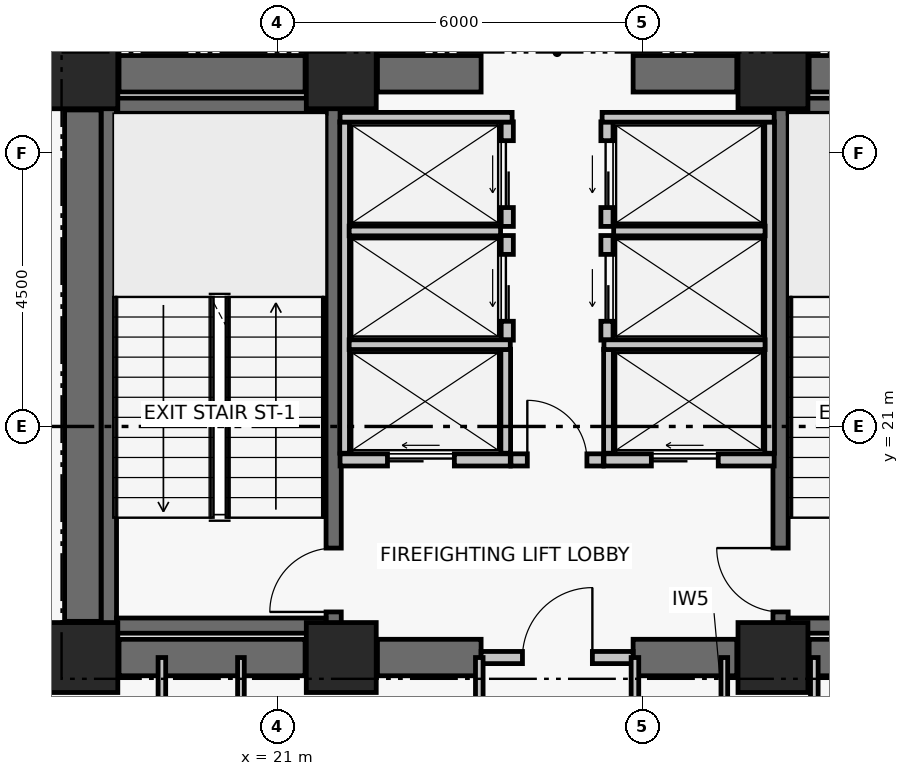
"""IFC4 building model, lengths in metres.
Left out: names, types, materials, properties, quantities, classifications, styles, units other than length and angle.
Written with IfcOpenShell. Run it as: python <this file> out.ifc"""

import sys

from ifc_helpers import new_model, si_unit, direction, frame, frame_2d, origin, origin_2d, place, context, subcontext, project, spatial, rectangle, extrude, element, fill, save


model = new_model("IFC4")
c1 = context("Model", 3, precision=1e-05, world=origin(), true_north=direction((0.0, 1.0)))
c2 = subcontext(c1, "Body", "Model", "MODEL_VIEW")
j1 = project(units=[si_unit("LENGTHUNIT", "METRE"), si_unit("PLANEANGLEUNIT", "RADIAN")], contexts=[c1])
p1 = place(None, origin())
s1 = spatial("IfcSite", under=j1, at=p1, CompositionType="ELEMENT")
p2 = place(p1, origin())
s2 = spatial("IfcBuilding", under=s1, at=p2, CompositionType="ELEMENT")
p3 = place(p2, frame((0.0, 0.0, 64.8)))
s3 = spatial("IfcBuildingStorey", under=s2, at=p3, CompositionType="ELEMENT", Elevation=64.8)
for number, where, z_axis, x_axis in (
    (1, (17.8, 17.2, 0.0), (0.0, 0.0, 1.0), (1.0, 0.0, 0.0)),
    (2, (22.05, 17.2, 0.0), (0.0, 0.0, 1.0), (1.0, 0.0, 0.0)),
    (3, (29.15, 17.2, 0.0), (0.0, 0.0, 1.0), (1.0, 0.0, 0.0)),
    (4, (17.8, 26.8, 0.0), (0.0, 0.0, 1.0), (1.0, 0.0, 0.0)),
    (5, (22.05, 26.8, 0.0), (0.0, 0.0, 1.0), (1.0, 0.0, 0.0)),
    (6, (29.15, 26.8, 0.0), (0.0, 0.0, 1.0), (1.0, 0.0, 0.0)),
):
    element("IfcColumn", number, at=place(p3, frame(where, z_axis=z_axis, x_axis=x_axis)), inside=s3, PredefinedType="COLUMN", context=c2, shape_type="SweptSolid", body=[
        extrude(rectangle(XDim=1.15, YDim=1.15, at=origin_2d()), origin(), (0.0, 0.0, 1.0), 3.72),
    ])
p4 = place(p3, frame((18.395, 17.2, 0.0), z_axis=(0.0, 0.0, 1.0), x_axis=(1.0, 0.0, 0.0)))
e7 = element("IfcWall", 7, at=p4, inside=s3, PredefinedType="SHEAR", context=c2, shape_type="SweptSolid", body=[
    extrude(rectangle(XDim=3.06, YDim=0.6, at=frame_2d((1.53, 0.0))), origin(), (0.0, 0.0, 1.0), 3.44),
])
p5 = place(p3, frame((22.645, 17.2, 0.0), z_axis=(0.0, 0.0, 1.0), x_axis=(1.0, 0.0, 0.0)))
e8 = element("IfcWall", 8, at=p5, inside=s3, PredefinedType="SHEAR", context=c2, shape_type="SweptSolid", body=[
    extrude(rectangle(XDim=1.705, YDim=0.6, at=frame_2d((0.853, 0.0))), origin(), (0.0, 0.0, 1.0), 3.44),
])
p6 = place(p3, frame((26.85, 17.2, 0.0), z_axis=(0.0, 0.0, 1.0), x_axis=(1.0, 0.0, 0.0)))
e9 = element("IfcWall", 9, at=p6, inside=s3, PredefinedType="SHEAR", context=c2, shape_type="SweptSolid", body=[
    extrude(rectangle(XDim=1.705, YDim=0.6, at=frame_2d((0.853, 0.0))), origin(), (0.0, 0.0, 1.0), 3.44),
])
p7 = place(p3, frame((29.745, 17.2, 0.0), z_axis=(0.0, 0.0, 1.0), x_axis=(1.0, 0.0, 0.0)))
e10 = element("IfcWall", 10, at=p7, inside=s3, PredefinedType="SHEAR", context=c2, shape_type="SweptSolid", body=[
    extrude(rectangle(XDim=3.06, YDim=0.6, at=frame_2d((1.53, 0.0))), origin(), (0.0, 0.0, 1.0), 3.44),
])
p8 = place(p3, frame((18.395, 26.8, 0.0), z_axis=(0.0, 0.0, 1.0), x_axis=(1.0, 0.0, 0.0)))
e11 = element("IfcWall", 11, at=p8, inside=s3, PredefinedType="SHEAR", context=c2, shape_type="SweptSolid", body=[
    extrude(rectangle(XDim=3.06, YDim=0.6, at=frame_2d((1.53, 0.0))), origin(), (0.0, 0.0, 1.0), 3.44),
])
p9 = place(p3, frame((22.645, 26.8, 0.0), z_axis=(0.0, 0.0, 1.0), x_axis=(1.0, 0.0, 0.0)))
e12 = element("IfcWall", 12, at=p9, inside=s3, PredefinedType="SHEAR", context=c2, shape_type="SweptSolid", body=[
    extrude(rectangle(XDim=1.705, YDim=0.6, at=frame_2d((0.853, 0.0))), origin(), (0.0, 0.0, 1.0), 3.44),
])
p10 = place(p3, frame((26.85, 26.8, 0.0), z_axis=(0.0, 0.0, 1.0), x_axis=(1.0, 0.0, 0.0)))
e13 = element("IfcWall", 13, at=p10, inside=s3, PredefinedType="SHEAR", context=c2, shape_type="SweptSolid", body=[
    extrude(rectangle(XDim=1.705, YDim=0.6, at=frame_2d((0.853, 0.0))), origin(), (0.0, 0.0, 1.0), 3.44),
])
p11 = place(p3, frame((29.745, 26.8, 0.0), z_axis=(0.0, 0.0, 1.0), x_axis=(1.0, 0.0, 0.0)))
e14 = element("IfcWall", 14, at=p11, inside=s3, PredefinedType="SHEAR", context=c2, shape_type="SweptSolid", body=[
    extrude(rectangle(XDim=3.06, YDim=0.6, at=frame_2d((1.53, 0.0))), origin(), (0.0, 0.0, 1.0), 3.44),
])
p12 = place(p3, frame((17.8, 17.795, 0.0), z_axis=(0.0, 0.0, 1.0), x_axis=(0.0, 1.0, 0.0)))
e15 = element("IfcWall", 15, at=p12, inside=s3, PredefinedType="SHEAR", context=c2, shape_type="SweptSolid", body=[
    extrude(rectangle(XDim=8.41, YDim=0.6, at=frame_2d((4.205, 0.0))), origin(), (0.0, 0.0, 1.0), 3.44),
])
p13 = place(p3, frame((18.229, 17.6, 0.0), z_axis=(0.0, 0.0, 1.0), x_axis=(0.0, 1.0, 0.0)))
e16 = element("IfcWall", 16, at=p13, inside=s3, PredefinedType="SHEAR", context=c2, shape_type="SweptSolid", body=[
    extrude(rectangle(XDim=8.8, YDim=0.25, at=frame_2d((4.4, 0.0))), origin(), (0.0, 0.0, 1.0), 3.44),
])
p14 = place(p3, frame((21.925, 17.6, 0.0), z_axis=(0.0, 0.0, 1.0), x_axis=(0.0, 1.0, 0.0)))
e17 = element("IfcWall", 17, at=p14, inside=s3, PredefinedType="SHEAR", context=c2, shape_type="SweptSolid", body=[
    extrude(rectangle(XDim=8.8, YDim=0.25, at=frame_2d((4.4, 0.0))), origin(), (0.0, 0.0, 1.0), 3.44),
])
p15 = place(p14, frame((0.35, 0.0, 0.0)))
e18 = element("IfcOpeningElement", 18, at=p15, cuts=e17, PredefinedType="OPENING", context=c2, shape_type="SweptSolid", body=[
    extrude(rectangle(XDim=1.05, YDim=2.08, at=frame_2d((0.525, 1.04))), frame((0.0, 0.135, 0.0), z_axis=(0.0, -1.0, 0.0), x_axis=(1.0, 0.0, 0.0)), (0.0, 0.0, 1.0), 0.27),
])
for number, where, z_axis, x_axis in (
    (19, (18.354, 17.725, 0.0), (0.0, 0.0, 1.0), (1.0, 0.0, 0.0)),
    (20, (18.354, 26.275, 0.0), (0.0, 0.0, 1.0), (1.0, 0.0, 0.0)),
):
    element("IfcWall", number, at=place(p3, frame(where, z_axis=z_axis, x_axis=x_axis)), inside=s3, PredefinedType="SHEAR", context=c2, shape_type="SweptSolid", body=[
        extrude(rectangle(XDim=3.446, YDim=0.25, at=frame_2d((1.723, 0.0))), origin(), (0.0, 0.0, 1.0), 3.44),
    ])
p16 = place(p3, frame((29.275, 17.6, 0.0), z_axis=(0.0, 0.0, 1.0), x_axis=(0.0, 1.0, 0.0)))
e21 = element("IfcWall", 21, at=p16, inside=s3, PredefinedType="SHEAR", context=c2, shape_type="SweptSolid", body=[
    extrude(rectangle(XDim=8.8, YDim=0.25, at=frame_2d((4.4, 0.0))), origin(), (0.0, 0.0, 1.0), 3.44),
])
p17 = place(p16, frame((0.35, 0.0, 0.0)))
e22 = element("IfcOpeningElement", 22, at=p17, cuts=e21, PredefinedType="OPENING", context=c2, shape_type="SweptSolid", body=[
    extrude(rectangle(XDim=1.05, YDim=2.08, at=frame_2d((0.525, 1.04))), frame((0.0, 0.135, 0.0), z_axis=(0.0, -1.0, 0.0), x_axis=(1.0, 0.0, 0.0)), (0.0, 0.0, 1.0), 0.27),
])
for number, where, z_axis, x_axis in (
    (23, (29.4, 17.725, 0.0), (0.0, 0.0, 1.0), (1.0, 0.0, 0.0)),
    (24, (29.4, 26.275, 0.0), (0.0, 0.0, 1.0), (1.0, 0.0, 0.0)),
):
    element("IfcWall", number, at=place(p3, frame(where, z_axis=z_axis, x_axis=x_axis)), inside=s3, PredefinedType="SHEAR", context=c2, shape_type="SweptSolid", body=[
        extrude(rectangle(XDim=3.446, YDim=0.25, at=frame_2d((1.723, 0.0))), origin(), (0.0, 0.0, 1.0), 3.44),
    ])
p18 = place(p3, frame((24.35, 17.2, 0.0), z_axis=(0.0, 0.0, 1.0), x_axis=(1.0, 0.0, 0.0)))
e25 = element("IfcWall", 25, at=p18, inside=s3, PredefinedType="PARTITIONING", context=c2, shape_type="SweptSolid", body=[
    extrude(rectangle(XDim=2.5, YDim=0.2, at=frame_2d((1.25, 0.0))), origin(), (0.0, 0.0, 1.0), 2.57),
])
p19 = place(p18, frame((0.68, 0.0, 0.0)))
e26 = element("IfcOpeningElement", 26, at=p19, cuts=e25, PredefinedType="OPENING", context=c2, shape_type="SweptSolid", body=[
    extrude(rectangle(XDim=1.15, YDim=2.08, at=frame_2d((0.575, 1.04))), frame((0.0, 0.11, 0.0), z_axis=(0.0, -1.0, 0.0), x_axis=(1.0, 0.0, 0.0)), (0.0, 0.0, 1.0), 0.22),
])
p20 = place(p3, frame((24.84, 20.45, 0.0), z_axis=(0.0, 0.0, 1.0), x_axis=(1.0, 0.0, 0.0)))
e27 = element("IfcWall", 27, at=p20, inside=s3, PredefinedType="PARTITIONING", context=c2, shape_type="SweptSolid", body=[
    extrude(rectangle(XDim=1.52, YDim=0.2, at=frame_2d((0.76, 0.0))), origin(), (0.0, 0.0, 1.0), 3.44),
])
p21 = place(p20, frame((0.27, 0.0, 0.0)))
e28 = element("IfcOpeningElement", 28, at=p21, cuts=e27, PredefinedType="OPENING", context=c2, shape_type="SweptSolid", body=[
    extrude(rectangle(XDim=0.98, YDim=2.06, at=frame_2d((0.49, 1.03))), frame((0.0, 0.11, 0.0), z_axis=(0.0, -1.0, 0.0), x_axis=(1.0, 0.0, 0.0)), (0.0, 0.0, 1.0), 0.22),
])
p22 = place(p3, frame((22.03, 20.45, 0.0), z_axis=(0.0, 0.0, 1.0), x_axis=(1.0, 0.0, 0.0)))
e29 = element("IfcWall", 29, at=p22, inside=s3, PredefinedType="PARTITIONING", context=c2, shape_type="SweptSolid", body=[
    extrude(rectangle(XDim=2.8, YDim=0.2, at=frame_2d((1.4, 0.0))), origin(), (0.0, 0.0, 1.0), 3.44),
])
p23 = place(p22, frame((0.78, 0.0, 0.0)))
e30 = element("IfcOpeningElement", 30, at=p23, cuts=e29, PredefinedType="OPENING", context=c2, shape_type="SweptSolid", body=[
    extrude(rectangle(XDim=1.1, YDim=2.08, at=frame_2d((0.55, 1.04))), frame((0.0, 0.11, 0.0), z_axis=(0.0, -1.0, 0.0), x_axis=(1.0, 0.0, 0.0)), (0.0, 0.0, 1.0), 0.22),
])
p24 = place(p3, frame((26.37, 20.45, 0.0), z_axis=(0.0, 0.0, 1.0), x_axis=(1.0, 0.0, 0.0)))
e31 = element("IfcWall", 31, at=p24, inside=s3, PredefinedType="PARTITIONING", context=c2, shape_type="SweptSolid", body=[
    extrude(rectangle(XDim=2.8, YDim=0.2, at=frame_2d((1.4, 0.0))), origin(), (0.0, 0.0, 1.0), 3.44),
])
p25 = place(p24, frame((0.78, 0.0, 0.0)))
e32 = element("IfcOpeningElement", 32, at=p25, cuts=e31, PredefinedType="OPENING", context=c2, shape_type="SweptSolid", body=[
    extrude(rectangle(XDim=1.1, YDim=2.08, at=frame_2d((0.55, 1.04))), frame((0.0, 0.11, 0.0), z_axis=(0.0, -1.0, 0.0), x_axis=(1.0, 0.0, 0.0)), (0.0, 0.0, 1.0), 0.22),
])
p26 = place(p3, frame((24.78, 22.42, 0.0), z_axis=(0.0, 0.0, 1.0), x_axis=(0.0, 1.0, 0.0)))
e33 = element("IfcWall", 33, at=p26, inside=s3, PredefinedType="PARTITIONING", context=c2, shape_type="SweptSolid", body=[
    extrude(rectangle(XDim=1.72, YDim=0.2, at=frame_2d((0.86, 0.0))), origin(), (0.0, 0.0, 1.0), 3.44),
])
p27 = place(p26, frame((0.31, 0.0, 0.0)))
e34 = element("IfcOpeningElement", 34, at=p27, cuts=e33, PredefinedType="OPENING", context=c2, shape_type="SweptSolid", body=[
    extrude(rectangle(XDim=1.1, YDim=2.08, at=frame_2d((0.55, 1.04))), frame((0.0, 0.11, 0.0), z_axis=(0.0, -1.0, 0.0), x_axis=(1.0, 0.0, 0.0)), (0.0, 0.0, 1.0), 0.22),
])
p28 = place(p3, frame((24.78, 24.29, 0.0), z_axis=(0.0, 0.0, 1.0), x_axis=(0.0, 1.0, 0.0)))
e35 = element("IfcWall", 35, at=p28, inside=s3, PredefinedType="PARTITIONING", context=c2, shape_type="SweptSolid", body=[
    extrude(rectangle(XDim=1.72, YDim=0.2, at=frame_2d((0.86, 0.0))), origin(), (0.0, 0.0, 1.0), 3.44),
])
p29 = place(p28, frame((0.31, 0.0, 0.0)))
e36 = element("IfcOpeningElement", 36, at=p29, cuts=e35, PredefinedType="OPENING", context=c2, shape_type="SweptSolid", body=[
    extrude(rectangle(XDim=1.1, YDim=2.08, at=frame_2d((0.55, 1.04))), frame((0.0, 0.11, 0.0), z_axis=(0.0, -1.0, 0.0), x_axis=(1.0, 0.0, 0.0)), (0.0, 0.0, 1.0), 0.22),
])
p30 = place(p3, frame((26.42, 22.42, 0.0), z_axis=(0.0, 0.0, 1.0), x_axis=(0.0, 1.0, 0.0)))
e37 = element("IfcWall", 37, at=p30, inside=s3, PredefinedType="PARTITIONING", context=c2, shape_type="SweptSolid", body=[
    extrude(rectangle(XDim=1.72, YDim=0.2, at=frame_2d((0.86, 0.0))), origin(), (0.0, 0.0, 1.0), 3.44),
])
p31 = place(p30, frame((0.31, 0.0, 0.0)))
e38 = element("IfcOpeningElement", 38, at=p31, cuts=e37, PredefinedType="OPENING", context=c2, shape_type="SweptSolid", body=[
    extrude(rectangle(XDim=1.1, YDim=2.08, at=frame_2d((0.55, 1.04))), frame((0.0, 0.11, 0.0), z_axis=(0.0, -1.0, 0.0), x_axis=(1.0, 0.0, 0.0)), (0.0, 0.0, 1.0), 0.22),
])
p32 = place(p3, frame((26.42, 24.29, 0.0), z_axis=(0.0, 0.0, 1.0), x_axis=(0.0, 1.0, 0.0)))
e39 = element("IfcWall", 39, at=p32, inside=s3, PredefinedType="PARTITIONING", context=c2, shape_type="SweptSolid", body=[
    extrude(rectangle(XDim=1.72, YDim=0.2, at=frame_2d((0.86, 0.0))), origin(), (0.0, 0.0, 1.0), 3.44),
])
p33 = place(p32, frame((0.31, 0.0, 0.0)))
e40 = element("IfcOpeningElement", 40, at=p33, cuts=e39, PredefinedType="OPENING", context=c2, shape_type="SweptSolid", body=[
    extrude(rectangle(XDim=1.1, YDim=2.08, at=frame_2d((0.55, 1.04))), frame((0.0, 0.11, 0.0), z_axis=(0.0, -1.0, 0.0), x_axis=(1.0, 0.0, 0.0)), (0.0, 0.0, 1.0), 0.22),
])
p34 = place(p3, frame((22.105, 20.56, 0.0), z_axis=(0.0, 0.0, 1.0), x_axis=(0.0, 1.0, 0.0)))
e41 = element("IfcWall", 41, at=p34, inside=s3, PredefinedType="PARTITIONING", context=c2, shape_type="SweptSolid", body=[
    extrude(rectangle(XDim=5.45, YDim=0.16, at=frame_2d((2.725, 0.0))), origin(), (0.0, 0.0, 1.0), 3.44),
])
p35 = place(p3, frame((24.755, 20.56, 0.0), z_axis=(0.0, 0.0, 1.0), x_axis=(0.0, 1.0, 0.0)))
e42 = element("IfcWall", 42, at=p35, inside=s3, PredefinedType="PARTITIONING", context=c2, shape_type="SweptSolid", body=[
    extrude(rectangle(XDim=1.71, YDim=0.16, at=frame_2d((0.855, 0.0))), origin(), (0.0, 0.0, 1.0), 3.44),
])
p36 = place(p3, frame((22.18, 22.345, 0.0), z_axis=(0.0, 0.0, 1.0), x_axis=(1.0, 0.0, 0.0)))
e43 = element("IfcWall", 43, at=p36, inside=s3, PredefinedType="PARTITIONING", context=c2, shape_type="SweptSolid", body=[
    extrude(rectangle(XDim=2.65, YDim=0.16, at=frame_2d((1.325, 0.0))), origin(), (0.0, 0.0, 1.0), 3.44),
])
p37 = place(p3, frame((22.18, 24.215, 0.0), z_axis=(0.0, 0.0, 1.0), x_axis=(1.0, 0.0, 0.0)))
e44 = element("IfcWall", 44, at=p37, inside=s3, PredefinedType="PARTITIONING", context=c2, shape_type="SweptSolid", body=[
    extrude(rectangle(XDim=2.49, YDim=0.16, at=frame_2d((1.245, 0.0))), origin(), (0.0, 0.0, 1.0), 3.44),
])
p38 = place(p3, frame((22.03, 26.085, 0.0), z_axis=(0.0, 0.0, 1.0), x_axis=(1.0, 0.0, 0.0)))
e45 = element("IfcWall", 45, at=p38, inside=s3, PredefinedType="PARTITIONING", context=c2, shape_type="SweptSolid", body=[
    extrude(rectangle(XDim=2.83, YDim=0.16, at=frame_2d((1.415, 0.0))), origin(), (0.0, 0.0, 1.0), 3.44),
])
p39 = place(p3, frame((29.095, 20.56, 0.0), z_axis=(0.0, 0.0, 1.0), x_axis=(0.0, 1.0, 0.0)))
e46 = element("IfcWall", 46, at=p39, inside=s3, PredefinedType="PARTITIONING", context=c2, shape_type="SweptSolid", body=[
    extrude(rectangle(XDim=5.45, YDim=0.16, at=frame_2d((2.725, 0.0))), origin(), (0.0, 0.0, 1.0), 3.44),
])
p40 = place(p3, frame((26.445, 20.56, 0.0), z_axis=(0.0, 0.0, 1.0), x_axis=(0.0, 1.0, 0.0)))
e47 = element("IfcWall", 47, at=p40, inside=s3, PredefinedType="PARTITIONING", context=c2, shape_type="SweptSolid", body=[
    extrude(rectangle(XDim=1.71, YDim=0.16, at=frame_2d((0.855, 0.0))), origin(), (0.0, 0.0, 1.0), 3.44),
])
p41 = place(p3, frame((26.37, 22.345, 0.0), z_axis=(0.0, 0.0, 1.0), x_axis=(1.0, 0.0, 0.0)))
e48 = element("IfcWall", 48, at=p41, inside=s3, PredefinedType="PARTITIONING", context=c2, shape_type="SweptSolid", body=[
    extrude(rectangle(XDim=2.65, YDim=0.16, at=frame_2d((1.325, 0.0))), origin(), (0.0, 0.0, 1.0), 3.44),
])
p42 = place(p3, frame((26.53, 24.215, 0.0), z_axis=(0.0, 0.0, 1.0), x_axis=(1.0, 0.0, 0.0)))
e49 = element("IfcWall", 49, at=p42, inside=s3, PredefinedType="PARTITIONING", context=c2, shape_type="SweptSolid", body=[
    extrude(rectangle(XDim=2.49, YDim=0.16, at=frame_2d((1.245, 0.0))), origin(), (0.0, 0.0, 1.0), 3.44),
])
p43 = place(p3, frame((26.34, 26.085, 0.0), z_axis=(0.0, 0.0, 1.0), x_axis=(1.0, 0.0, 0.0)))
e50 = element("IfcWall", 50, at=p43, inside=s3, PredefinedType="PARTITIONING", context=c2, shape_type="SweptSolid", body=[
    extrude(rectangle(XDim=2.83, YDim=0.16, at=frame_2d((1.415, 0.0))), origin(), (0.0, 0.0, 1.0), 3.44),
])
p44 = place(p3, frame((19.1, 14.95, 0.0), z_axis=(0.0, 0.0, 1.0), x_axis=(0.0, 1.0, 0.0)))
e51 = element("IfcWall", 51, at=p44, inside=s3, PredefinedType="PARTITIONING", context=c2, shape_type="SweptSolid", body=[
    extrude(rectangle(XDim=2.25, YDim=0.125, at=frame_2d((1.125, 0.0))), origin(), (0.0, 0.0, 1.0), 2.57),
])
p45 = place(p3, frame((20.4, 14.95, 0.0), z_axis=(0.0, 0.0, 1.0), x_axis=(0.0, 1.0, 0.0)))
e52 = element("IfcWall", 52, at=p45, inside=s3, PredefinedType="PARTITIONING", context=c2, shape_type="SweptSolid", body=[
    extrude(rectangle(XDim=2.25, YDim=0.11, at=frame_2d((1.125, 0.0))), origin(), (0.0, 0.0, 1.0), 2.57),
])
for number, where, z_axis, x_axis in (
    (53, (24.32, 14.95, 0.0), (0.0, 0.0, 1.0), (0.0, 1.0, 0.0)),
    (54, (26.88, 14.95, 0.0), (0.0, 0.0, 1.0), (0.0, 1.0, 0.0)),
):
    element("IfcWall", number, at=place(p3, frame(where, z_axis=z_axis, x_axis=x_axis)), inside=s3, PredefinedType="PARTITIONING", context=c2, shape_type="SweptSolid", body=[
        extrude(rectangle(XDim=2.25, YDim=0.125, at=frame_2d((1.125, 0.0))), origin(), (0.0, 0.0, 1.0), 2.57),
    ])
p46 = place(p3, frame((28.35, 14.95, 0.0), z_axis=(0.0, 0.0, 1.0), x_axis=(0.0, 1.0, 0.0)))
e55 = element("IfcWall", 55, at=p46, inside=s3, PredefinedType="PARTITIONING", context=c2, shape_type="SweptSolid", body=[
    extrude(rectangle(XDim=2.25, YDim=0.11, at=frame_2d((1.125, 0.0))), origin(), (0.0, 0.0, 1.0), 2.57),
])
p47 = place(p3, frame((29.83, 14.95, 0.0), z_axis=(0.0, 0.0, 1.0), x_axis=(0.0, 1.0, 0.0)))
e56 = element("IfcWall", 56, at=p47, inside=s3, PredefinedType="PARTITIONING", context=c2, shape_type="SweptSolid", body=[
    extrude(rectangle(XDim=2.25, YDim=0.125, at=frame_2d((1.125, 0.0))), origin(), (0.0, 0.0, 1.0), 2.57),
])
p48 = place(p15, origin())
e57 = element("IfcDoor", 57, at=p48, inside=s3, OperationType="SINGLE_SWING_LEFT", PredefinedType="DOOR", context=c2, shape_type="SweptSolid", body=[
    extrude(rectangle(XDim=1.05, YDim=2.08, at=frame_2d((0.525, 1.04))), frame((0.0, 0.025, 0.0), z_axis=(0.0, -1.0, 0.0), x_axis=(1.0, 0.0, 0.0)), (0.0, 0.0, 1.0), 0.05),
])
fill(e18, e57)
p49 = place(p17, origin())
e58 = element("IfcDoor", 58, at=p49, inside=s3, OperationType="SINGLE_SWING_RIGHT", PredefinedType="DOOR", context=c2, shape_type="SweptSolid", body=[
    extrude(rectangle(XDim=1.05, YDim=2.08, at=frame_2d((0.525, 1.04))), frame((0.0, 0.025, 0.0), z_axis=(0.0, -1.0, 0.0), x_axis=(1.0, 0.0, 0.0)), (0.0, 0.0, 1.0), 0.05),
])
fill(e22, e58)
p50 = place(p19, origin())
e59 = element("IfcDoor", 59, at=p50, inside=s3, OperationType="SINGLE_SWING_RIGHT", PredefinedType="DOOR", context=c2, shape_type="SweptSolid", body=[
    extrude(rectangle(XDim=1.15, YDim=2.08, at=frame_2d((0.575, 1.04))), frame((0.0, 0.025, 0.0), z_axis=(0.0, -1.0, 0.0), x_axis=(1.0, 0.0, 0.0)), (0.0, 0.0, 1.0), 0.05),
])
fill(e26, e59)
p51 = place(p21, origin())
e60 = element("IfcDoor", 60, at=p51, inside=s3, OperationType="SINGLE_SWING_LEFT", PredefinedType="DOOR", context=c2, shape_type="SweptSolid", body=[
    extrude(rectangle(XDim=0.98, YDim=2.06, at=frame_2d((0.49, 1.03))), frame((0.0, 0.025, 0.0), z_axis=(0.0, -1.0, 0.0), x_axis=(1.0, 0.0, 0.0)), (0.0, 0.0, 1.0), 0.05),
])
fill(e28, e60)
p52 = place(p23, origin())
e61 = element("IfcDoor", 61, at=p52, inside=s3, OperationType="DOUBLE_DOOR_SLIDING", PredefinedType="DOOR", context=c2, shape_type="SweptSolid", body=[
    extrude(rectangle(XDim=1.1, YDim=2.08, at=frame_2d((0.55, 1.04))), frame((0.0, 0.025, 0.0), z_axis=(0.0, -1.0, 0.0), x_axis=(1.0, 0.0, 0.0)), (0.0, 0.0, 1.0), 0.05),
])
fill(e30, e61)
p53 = place(p25, origin())
e62 = element("IfcDoor", 62, at=p53, inside=s3, OperationType="DOUBLE_DOOR_SLIDING", PredefinedType="DOOR", context=c2, shape_type="SweptSolid", body=[
    extrude(rectangle(XDim=1.1, YDim=2.08, at=frame_2d((0.55, 1.04))), frame((0.0, 0.025, 0.0), z_axis=(0.0, -1.0, 0.0), x_axis=(1.0, 0.0, 0.0)), (0.0, 0.0, 1.0), 0.05),
])
fill(e32, e62)
p54 = place(p27, origin())
e63 = element("IfcDoor", 63, at=p54, inside=s3, OperationType="DOUBLE_DOOR_SLIDING", PredefinedType="DOOR", context=c2, shape_type="SweptSolid", body=[
    extrude(rectangle(XDim=1.1, YDim=2.08, at=frame_2d((0.55, 1.04))), frame((0.0, 0.025, 0.0), z_axis=(0.0, -1.0, 0.0), x_axis=(1.0, 0.0, 0.0)), (0.0, 0.0, 1.0), 0.05),
])
fill(e34, e63)
p55 = place(p29, origin())
e64 = element("IfcDoor", 64, at=p55, inside=s3, OperationType="DOUBLE_DOOR_SLIDING", PredefinedType="DOOR", context=c2, shape_type="SweptSolid", body=[
    extrude(rectangle(XDim=1.1, YDim=2.08, at=frame_2d((0.55, 1.04))), frame((0.0, 0.025, 0.0), z_axis=(0.0, -1.0, 0.0), x_axis=(1.0, 0.0, 0.0)), (0.0, 0.0, 1.0), 0.05),
])
fill(e36, e64)
p56 = place(p31, origin())
e65 = element("IfcDoor", 65, at=p56, inside=s3, OperationType="DOUBLE_DOOR_SLIDING", PredefinedType="DOOR", context=c2, shape_type="SweptSolid", body=[
    extrude(rectangle(XDim=1.1, YDim=2.08, at=frame_2d((0.55, 1.04))), frame((0.0, 0.025, 0.0), z_axis=(0.0, -1.0, 0.0), x_axis=(1.0, 0.0, 0.0)), (0.0, 0.0, 1.0), 0.05),
])
fill(e38, e65)
p57 = place(p33, origin())
e66 = element("IfcDoor", 66, at=p57, inside=s3, OperationType="DOUBLE_DOOR_SLIDING", PredefinedType="DOOR", context=c2, shape_type="SweptSolid", body=[
    extrude(rectangle(XDim=1.1, YDim=2.08, at=frame_2d((0.55, 1.04))), frame((0.0, 0.025, 0.0), z_axis=(0.0, -1.0, 0.0), x_axis=(1.0, 0.0, 0.0)), (0.0, 0.0, 1.0), 0.05),
])
fill(e40, e66)
save(model, sys.argv[1])
